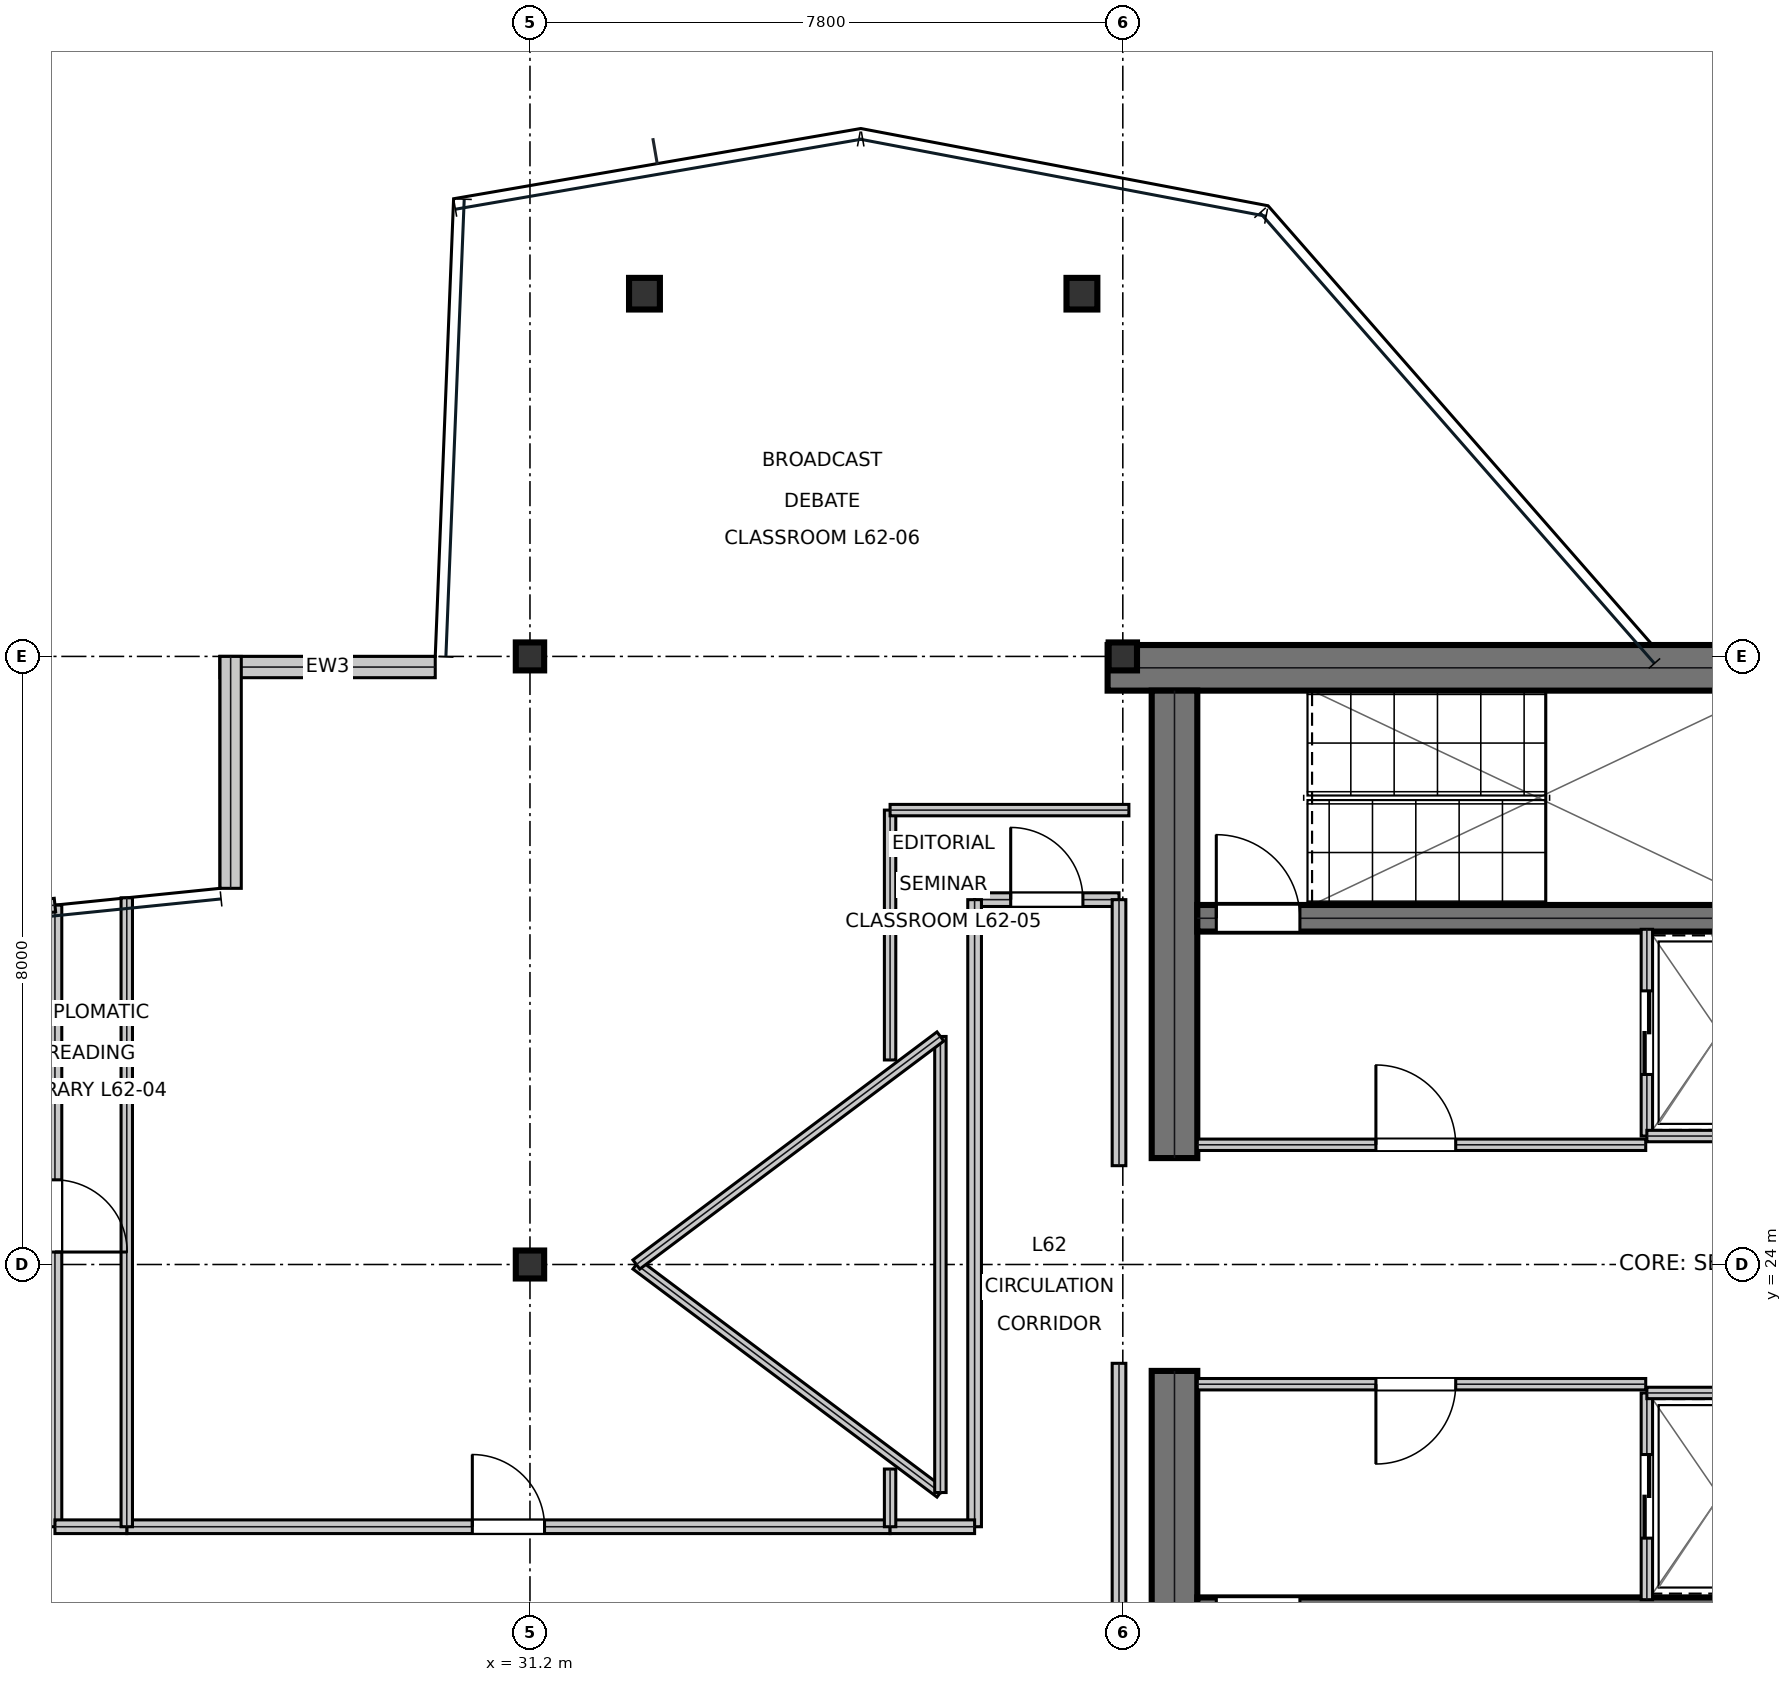
"""IFC4 building model, lengths in metres.
Left out: names, types, materials, properties, quantities, classifications, styles, units other than length and angle.
Written with IfcOpenShell. Run it as: python <this file> out.ifc"""

import sys

from ifc_helpers import new_model, si_unit, direction, frame, frame_2d, origin, origin_2d, place, context, subcontext, project, spatial, rectangle, i_section, extrude, element, fill, save


model = new_model("IFC4")
c1 = context("Model", 3, precision=1e-05, world=origin(), true_north=direction((0.0, 1.0)))
c2 = subcontext(c1, "Body", "Model", "MODEL_VIEW")
j1 = project(units=[si_unit("LENGTHUNIT", "METRE"), si_unit("PLANEANGLEUNIT", "RADIAN")], contexts=[c1])
p1 = place(None, origin())
s1 = spatial("IfcSite", under=j1, at=p1, CompositionType="ELEMENT")
p2 = place(p1, origin())
s2 = spatial("IfcBuilding", under=s1, at=p2, CompositionType="ELEMENT")
p3 = place(p2, frame((0.0, 0.0, 266.85)))
s3 = spatial("IfcBuildingStorey", under=s2, at=p3, CompositionType="ELEMENT", Elevation=266.85)
p4 = place(p3, frame((38.8, 31.85, 0.0), z_axis=(0.0, 0.0, 1.0), x_axis=(1.0, 0.0, 0.0)))
e1 = element("IfcWall", 1, at=p4, inside=s3, PredefinedType="SHEAR", context=c2, shape_type="SweptSolid", body=[
    extrude(rectangle(XDim=16.0, YDim=0.6, at=frame_2d((8.0, 0.0))), origin(), (0.0, 0.0, 1.0), 3.81),
])
for number, where, z_axis, x_axis in (
    (2, (39.68, 16.45, 0.0), (0.0, 0.0, 1.0), (0.0, 1.0, 0.0)),
    (3, (39.68, 25.4, 0.0), (0.0, 0.0, 1.0), (0.0, 1.0, 0.0)),
):
    element("IfcWall", number, at=place(p3, frame(where, z_axis=z_axis, x_axis=x_axis)), inside=s3, PredefinedType="SHEAR", context=c2, shape_type="SweptSolid", body=[
        extrude(rectangle(XDim=6.15, YDim=0.6, at=frame_2d((3.075, 0.0))), origin(), (0.0, 0.0, 1.0), 3.81),
    ])
p5 = place(p3, frame((39.98, 28.555, 0.0), z_axis=(0.0, 0.0, 1.0), x_axis=(1.0, 0.0, 0.0)))
e4 = element("IfcWall", 4, at=p5, inside=s3, PredefinedType="SHEAR", context=c2, shape_type="SweptSolid", body=[
    extrude(rectangle(XDim=7.71, YDim=0.35, at=frame_2d((3.855, 0.0))), origin(), (0.0, 0.0, 1.0), 3.81),
])
p6 = place(p5, frame((0.25, 0.0, 0.0)))
e5 = element("IfcOpeningElement", 5, at=p6, cuts=e4, PredefinedType="OPENING", context=c2, shape_type="SweptSolid", body=[
    extrude(rectangle(XDim=1.1, YDim=2.15, at=frame_2d((0.55, 1.075))), frame((0.0, 0.185, 0.0), z_axis=(0.0, -1.0, 0.0), x_axis=(1.0, 0.0, 0.0)), (0.0, 0.0, 1.0), 0.37),
])
p7 = place(p3, frame((39.98, 19.445, 0.0), z_axis=(0.0, 0.0, 1.0), x_axis=(1.0, 0.0, 0.0)))
e6 = element("IfcWall", 6, at=p7, inside=s3, PredefinedType="SHEAR", context=c2, shape_type="SweptSolid", body=[
    extrude(rectangle(XDim=7.71, YDim=0.35, at=frame_2d((3.855, 0.0))), origin(), (0.0, 0.0, 1.0), 3.81),
])
p8 = place(p7, frame((0.25, 0.0, 0.0)))
e7 = element("IfcOpeningElement", 7, at=p8, cuts=e6, PredefinedType="OPENING", context=c2, shape_type="SweptSolid", body=[
    extrude(rectangle(XDim=1.1, YDim=2.15, at=frame_2d((0.55, 1.075))), frame((0.0, 0.185, 0.0), z_axis=(0.0, -1.0, 0.0), x_axis=(1.0, 0.0, 0.0)), (0.0, 0.0, 1.0), 0.37),
])
for number, where, z_axis, x_axis in (
    (8, (31.2, 24.0, 0.0), (0.0, 0.0, 1.0), (1.0, 0.0, 0.0)),
    (9, (31.2, 32.0, 0.0), (0.0, 0.0, 1.0), (1.0, 0.0, 0.0)),
    (10, (39.0, 32.0, 0.0), (0.0, 0.0, 1.0), (1.0, 0.0, 0.0)),
):
    element("IfcColumn", number, at=place(p3, frame(where, z_axis=z_axis, x_axis=x_axis)), inside=s3, PredefinedType="COLUMN", context=c2, shape_type="SweptSolid", body=[
        extrude(i_section(OverallWidth=0.373, OverallDepth=0.368, WebThickness=0.015, FlangeThickness=0.024, at=origin_2d()), origin(), (0.0, 0.0, 1.0), 4.044),
    ])
for number, where, z_axis, x_axis in (
    (11, (32.706, 36.772, 0.016), (0.0, 0.0, 1.0), (1.0, 0.0, 0.0)),
    (12, (38.462, 36.772, 0.016), (0.0, 0.0, 1.0), (1.0, 0.0, 0.0)),
):
    element("IfcColumn", number, at=place(p3, frame(where, z_axis=z_axis, x_axis=x_axis)), inside=s3, PredefinedType="COLUMN", context=c2, shape_type="SweptSolid", body=[
        extrude(i_section(OverallWidth=0.406, OverallDepth=0.416, WebThickness=0.03, FlangeThickness=0.048, at=origin_2d()), origin(), (0.0, 0.0, 1.0), 4.018),
    ])
p9 = place(p3, frame((29.954, 31.86, 0.0), z_axis=(0.0, 0.0, 1.0), x_axis=(-1.0, 0.0, 0.0)))
e13 = element("IfcWall", 13, at=p9, inside=s3, PredefinedType="STANDARD", context=c2, shape_type="SweptSolid", body=[
    extrude(rectangle(XDim=2.832, YDim=0.28, at=frame_2d((1.416, 0.0))), origin(), (0.0, 0.0, 1.0), 3.81),
])
p10 = place(p3, frame((27.262, 32.0, 0.0), z_axis=(0.0, 0.0, 1.0), x_axis=(0.0, -1.0, 0.0)))
e14 = element("IfcWall", 14, at=p10, inside=s3, PredefinedType="STANDARD", context=c2, shape_type="SweptSolid", body=[
    extrude(rectangle(XDim=3.051, YDim=0.28, at=frame_2d((1.526, 0.0))), origin(), (0.0, 0.0, 1.0), 3.339),
])
p11 = place(p3, frame((39.98, 25.575, 0.0), z_axis=(0.0, 0.0, 1.0), x_axis=(1.0, 0.0, 0.0)))
e15 = element("IfcWall", 15, at=p11, inside=s3, PredefinedType="PARTITIONING", context=c2, shape_type="SweptSolid", body=[
    extrude(rectangle(XDim=5.9, YDim=0.15, at=frame_2d((2.95, 0.0))), origin(), (0.0, 0.0, 1.0), 3.81),
])
p12 = place(p11, frame((2.35, 0.0, 0.0)))
e16 = element("IfcOpeningElement", 16, at=p12, cuts=e15, PredefinedType="OPENING", context=c2, shape_type="SweptSolid", body=[
    extrude(rectangle(XDim=1.05, YDim=2.15, at=frame_2d((0.525, 1.075))), frame((0.0, 0.085, 0.0), z_axis=(0.0, -1.0, 0.0), x_axis=(1.0, 0.0, 0.0)), (0.0, 0.0, 1.0), 0.17),
])
p13 = place(p3, frame((39.98, 22.425, 0.0), z_axis=(0.0, 0.0, 1.0), x_axis=(1.0, 0.0, 0.0)))
e17 = element("IfcWall", 17, at=p13, inside=s3, PredefinedType="PARTITIONING", context=c2, shape_type="SweptSolid", body=[
    extrude(rectangle(XDim=5.9, YDim=0.15, at=frame_2d((2.95, 0.0))), origin(), (0.0, 0.0, 1.0), 3.81),
])
p14 = place(p13, frame((2.35, 0.0, 0.0)))
e18 = element("IfcOpeningElement", 18, at=p14, cuts=e17, PredefinedType="OPENING", context=c2, shape_type="SweptSolid", body=[
    extrude(rectangle(XDim=1.05, YDim=2.15, at=frame_2d((0.525, 1.075))), frame((0.0, 0.085, 0.0), z_axis=(0.0, -1.0, 0.0), x_axis=(1.0, 0.0, 0.0)), (0.0, 0.0, 1.0), 0.17),
])
p15 = place(p3, frame((45.895, 25.69, 0.0), z_axis=(0.0, 0.0, 1.0), x_axis=(0.0, 1.0, 0.0)))
e19 = element("IfcWall", 19, at=p15, inside=s3, PredefinedType="PARTITIONING", context=c2, shape_type="SweptSolid", body=[
    extrude(rectangle(XDim=2.72, YDim=0.15, at=frame_2d((1.36, 0.0))), origin(), (0.0, 0.0, 1.0), 3.81),
])
p16 = place(p15, frame((0.81, 0.0, 0.0)))
e20 = element("IfcOpeningElement", 20, at=p16, cuts=e19, PredefinedType="OPENING", context=c2, shape_type="SweptSolid", body=[
    extrude(rectangle(XDim=1.1, YDim=2.15, at=frame_2d((0.55, 1.075))), frame((0.0, 0.085, 0.0), z_axis=(0.0, -1.0, 0.0), x_axis=(1.0, 0.0, 0.0)), (0.0, 0.0, 1.0), 0.17),
])
p17 = place(p3, frame((45.895, 25.69, 0.0), z_axis=(0.0, 0.0, 1.0), x_axis=(1.0, 0.0, 0.0)))
e21 = element("IfcWall", 21, at=p17, inside=s3, PredefinedType="PARTITIONING", context=c2, shape_type="SweptSolid", body=[
    extrude(rectangle(XDim=1.915, YDim=0.15, at=frame_2d((0.958, 0.0))), origin(), (0.0, 0.0, 1.0), 3.81),
])
p18 = place(p3, frame((45.895, 19.59, 0.0), z_axis=(0.0, 0.0, 1.0), x_axis=(0.0, 1.0, 0.0)))
e22 = element("IfcWall", 22, at=p18, inside=s3, PredefinedType="PARTITIONING", context=c2, shape_type="SweptSolid", body=[
    extrude(rectangle(XDim=2.72, YDim=0.15, at=frame_2d((1.36, 0.0))), origin(), (0.0, 0.0, 1.0), 3.81),
])
p19 = place(p18, frame((0.81, 0.0, 0.0)))
e23 = element("IfcOpeningElement", 23, at=p19, cuts=e22, PredefinedType="OPENING", context=c2, shape_type="SweptSolid", body=[
    extrude(rectangle(XDim=1.1, YDim=2.15, at=frame_2d((0.55, 1.075))), frame((0.0, 0.085, 0.0), z_axis=(0.0, -1.0, 0.0), x_axis=(1.0, 0.0, 0.0)), (0.0, 0.0, 1.0), 0.17),
])
p20 = place(p3, frame((45.895, 22.31, 0.0), z_axis=(0.0, 0.0, 1.0), x_axis=(1.0, 0.0, 0.0)))
e24 = element("IfcWall", 24, at=p20, inside=s3, PredefinedType="PARTITIONING", context=c2, shape_type="SweptSolid", body=[
    extrude(rectangle(XDim=1.915, YDim=0.15, at=frame_2d((0.958, 0.0))), origin(), (0.0, 0.0, 1.0), 3.81),
])
p21 = place(p3, frame((24.95, 20.55, 0.0), z_axis=(0.0, 0.0, 1.0), x_axis=(0.0, 1.0, 0.0)))
e25 = element("IfcWall", 25, at=p21, inside=s3, PredefinedType="SOLIDWALL", context=c2, shape_type="SweptSolid", body=[
    extrude(rectangle(XDim=8.178, YDim=0.18, at=frame_2d((4.089, 0.0))), origin(), (0.0, 0.0, 1.0), 3.27),
])
p22 = place(p21, frame((3.614, 0.0, 0.0)))
e26 = element("IfcOpeningElement", 26, at=p22, cuts=e25, PredefinedType="OPENING", context=c2, shape_type="SweptSolid", body=[
    extrude(rectangle(XDim=0.95, YDim=2.15, at=frame_2d((0.475, 1.075))), frame((0.0, 0.1, 0.0), z_axis=(0.0, -1.0, 0.0), x_axis=(1.0, 0.0, 0.0)), (0.0, 0.0, 1.0), 0.2),
])
p23 = place(p3, frame((37.05, 28.8, 0.0), z_axis=(0.0, 0.0, 1.0), x_axis=(1.0, 0.0, 0.0)))
e27 = element("IfcWall", 27, at=p23, inside=s3, PredefinedType="SOLIDWALL", context=c2, shape_type="SweptSolid", body=[
    extrude(rectangle(XDim=1.9, YDim=0.18, at=frame_2d((0.95, 0.0))), origin(), (0.0, 0.0, 1.0), 3.81),
])
p24 = place(p23, frame((0.475, 0.0, 0.0)))
e28 = element("IfcOpeningElement", 28, at=p24, cuts=e27, PredefinedType="OPENING", context=c2, shape_type="SweptSolid", body=[
    extrude(rectangle(XDim=0.95, YDim=2.15, at=frame_2d((0.475, 1.075))), frame((0.0, 0.1, 0.0), z_axis=(0.0, -1.0, 0.0), x_axis=(1.0, 0.0, 0.0)), (0.0, 0.0, 1.0), 0.2),
])
p25 = place(p3, frame((25.895, 20.55, 0.0), z_axis=(0.0, 0.0, 1.0), x_axis=(1.0, 0.0, 0.0)))
e29 = element("IfcWall", 29, at=p25, inside=s3, PredefinedType="SOLIDWALL", context=c2, shape_type="SweptSolid", body=[
    extrude(rectangle(XDim=10.043, YDim=0.18, at=frame_2d((5.021, 0.0))), origin(), (0.0, 0.0, 1.0), 3.27),
])
p26 = place(p25, frame((4.546, 0.0, 0.0)))
e30 = element("IfcOpeningElement", 30, at=p26, cuts=e29, PredefinedType="OPENING", context=c2, shape_type="SweptSolid", body=[
    extrude(rectangle(XDim=0.95, YDim=2.15, at=frame_2d((0.475, 1.075))), frame((0.0, 0.1, 0.0), z_axis=(0.0, -1.0, 0.0), x_axis=(1.0, 0.0, 0.0)), (0.0, 0.0, 1.0), 0.2),
])
p27 = place(p3, frame((38.95, 18.8, 0.0), z_axis=(0.0, 0.0, 1.0), x_axis=(0.0, 1.0, 0.0)))
e31 = element("IfcWall", 31, at=p27, inside=s3, PredefinedType="SOLIDWALL", context=c2, shape_type="SweptSolid", body=[
    extrude(rectangle(XDim=3.9, YDim=0.18, at=frame_2d((1.95, 0.0))), origin(), (0.0, 0.0, 1.0), 3.54),
])
p28 = place(p3, frame((23.872, 28.618, 0.0), z_axis=(0.0, 0.0, 1.0), x_axis=(0.994866145346, 0.101199569384, 0.0)))
e32 = element("IfcWall", 32, at=p28, inside=s3, PredefinedType="SOLIDWALL", context=c2, shape_type="SweptSolid", body=[
    extrude(rectangle(XDim=1.083, YDim=0.18, at=frame_2d((0.542, 0.0))), origin(), (0.0, 0.0, 1.0), 3.81),
])
p29 = place(p3, frame((24.95, 20.55, 0.0), z_axis=(0.0, 0.0, 1.0), x_axis=(1.0, 0.0, 0.0)))
e33 = element("IfcWall", 33, at=p29, inside=s3, PredefinedType="SOLIDWALL", context=c2, shape_type="SweptSolid", body=[
    extrude(rectangle(XDim=0.945, YDim=0.18, at=frame_2d((0.473, 0.0))), origin(), (0.0, 0.0, 1.0), 3.81),
])
p30 = place(p3, frame((37.05, 20.55, 0.0), z_axis=(0.0, 0.0, 1.0), x_axis=(0.0, 1.0, 0.0)))
e34 = element("IfcWall", 34, at=p30, inside=s3, PredefinedType="SOLIDWALL", context=c2, shape_type="SweptSolid", body=[
    extrude(rectangle(XDim=8.25, YDim=0.18, at=frame_2d((4.125, 0.0))), origin(), (0.0, 0.0, 1.0), 3.54),
])
p31 = place(p3, frame((38.95, 25.3, 0.0), z_axis=(0.0, 0.0, 1.0), x_axis=(0.0, 1.0, 0.0)))
e35 = element("IfcWall", 35, at=p31, inside=s3, PredefinedType="SOLIDWALL", context=c2, shape_type="SweptSolid", body=[
    extrude(rectangle(XDim=3.5, YDim=0.18, at=frame_2d((1.75, 0.0))), origin(), (0.0, 0.0, 1.0), 3.54),
])
p32 = place(p3, frame((35.938, 20.55, 0.0), z_axis=(0.0, 0.0, 1.0), x_axis=(1.0, 0.0, 0.0)))
e36 = element("IfcWall", 36, at=p32, inside=s3, PredefinedType="SOLIDWALL", context=c2, shape_type="SweptSolid", body=[
    extrude(rectangle(XDim=1.112, YDim=0.18, at=frame_2d((0.556, 0.0))), origin(), (0.0, 0.0, 1.0), 3.54),
])
p33 = place(p3, frame((25.895, 20.55, 0.0), z_axis=(0.0, 0.0, 1.0), x_axis=(0.0, 1.0, 0.0)))
e37 = element("IfcWall", 37, at=p33, inside=s3, PredefinedType="MOVABLE", context=c2, shape_type="SweptSolid", body=[
    extrude(rectangle(XDim=8.274, YDim=0.15, at=frame_2d((4.137, 0.0))), origin(), (0.0, 0.0, 1.0), 3.27),
])
p34 = place(p3, frame((35.938, 26.691, 0.0), z_axis=(0.0, 0.0, 1.0), x_axis=(0.0, 1.0, 0.0)))
e38 = element("IfcWall", 38, at=p34, inside=s3, PredefinedType="MOVABLE", context=c2, shape_type="SweptSolid", body=[
    extrude(rectangle(XDim=3.287, YDim=0.15, at=frame_2d((1.644, 0.0))), origin(), (0.0, 0.0, 1.0), 3.54),
])
p35 = place(p3, frame((35.938, 29.978, 0.0), z_axis=(0.0, 0.0, 1.0), x_axis=(1.0, 0.0, 0.0)))
e39 = element("IfcWall", 39, at=p35, inside=s3, PredefinedType="MOVABLE", context=c2, shape_type="SweptSolid", body=[
    extrude(rectangle(XDim=3.142, YDim=0.15, at=frame_2d((1.571, 0.0))), origin(), (0.0, 0.0, 1.0), 3.54),
])
p36 = place(p3, frame((35.938, 20.55, 0.0), z_axis=(0.0, 0.0, 1.0), x_axis=(0.0, 1.0, 0.0)))
e40 = element("IfcWall", 40, at=p36, inside=s3, PredefinedType="MOVABLE", context=c2, shape_type="SweptSolid", body=[
    extrude(rectangle(XDim=0.759, YDim=0.15, at=frame_2d((0.379, 0.0))), origin(), (0.0, 0.0, 1.0), 3.81),
])
p37 = place(p3, frame((32.6, 24.0, 0.0), z_axis=(0.0, 0.0, 1.0), x_axis=(0.8, -0.6, 0.0)))
e41 = element("IfcWall", 41, at=p37, inside=s3, PredefinedType="MOVABLE", context=c2, shape_type="SweptSolid", body=[
    extrude(rectangle(XDim=5.0, YDim=0.15, at=frame_2d((2.5, 0.0))), origin(), (0.0, 0.0, 1.0), 3.81),
])
p38 = place(p3, frame((36.6, 21.0, 0.0), z_axis=(0.0, 0.0, 1.0), x_axis=(0.0, 1.0, 0.0)))
e42 = element("IfcWall", 42, at=p38, inside=s3, PredefinedType="MOVABLE", context=c2, shape_type="SweptSolid", body=[
    extrude(rectangle(XDim=6.0, YDim=0.15, at=frame_2d((3.0, 0.0))), origin(), (0.0, 0.0, 1.0), 3.81),
])
p39 = place(p3, frame((36.6, 27.0, 0.0), z_axis=(0.0, 0.0, 1.0), x_axis=(-0.8, -0.6, 0.0)))
e43 = element("IfcWall", 43, at=p39, inside=s3, PredefinedType="MOVABLE", context=c2, shape_type="SweptSolid", body=[
    extrude(rectangle(XDim=5.0, YDim=0.15, at=frame_2d((2.5, 0.0))), origin(), (0.0, 0.0, 1.0), 3.81),
])
p40 = place(p12, origin())
e44 = element("IfcDoor", 44, at=p40, inside=s3, OperationType="SINGLE_SWING_LEFT", PredefinedType="DOOR", context=c2, shape_type="SweptSolid", body=[
    extrude(rectangle(XDim=1.05, YDim=2.15, at=frame_2d((0.525, 1.075))), frame((0.0, 0.025, 0.0), z_axis=(0.0, -1.0, 0.0), x_axis=(1.0, 0.0, 0.0)), (0.0, 0.0, 1.0), 0.05),
])
fill(e16, e44)
p41 = place(p14, frame((1.05, 0.0, 0.0), z_axis=(0.0, 0.0, 1.0), x_axis=(-1.0, 0.0, 0.0)))
e45 = element("IfcDoor", 45, at=p41, inside=s3, OperationType="SINGLE_SWING_RIGHT", PredefinedType="DOOR", context=c2, shape_type="SweptSolid", body=[
    extrude(rectangle(XDim=1.05, YDim=2.15, at=frame_2d((0.525, 1.075))), frame((0.0, 0.025, 0.0), z_axis=(0.0, -1.0, 0.0), x_axis=(1.0, 0.0, 0.0)), (0.0, 0.0, 1.0), 0.05),
])
fill(e18, e45)
p42 = place(p16, frame((1.1, 0.0, 0.0), z_axis=(0.0, 0.0, 1.0), x_axis=(-1.0, 0.0, 0.0)))
e46 = element("IfcDoor", 46, at=p42, inside=s3, OperationType="DOUBLE_DOOR_SLIDING", PredefinedType="DOOR", context=c2, shape_type="SweptSolid", body=[
    extrude(rectangle(XDim=1.1, YDim=2.15, at=frame_2d((0.55, 1.075))), frame((0.0, 0.025, 0.0), z_axis=(0.0, -1.0, 0.0), x_axis=(1.0, 0.0, 0.0)), (0.0, 0.0, 1.0), 0.05),
])
fill(e20, e46)
p43 = place(p19, frame((1.1, 0.0, 0.0), z_axis=(0.0, 0.0, 1.0), x_axis=(-1.0, 0.0, 0.0)))
e47 = element("IfcDoor", 47, at=p43, inside=s3, OperationType="DOUBLE_DOOR_SLIDING", PredefinedType="DOOR", context=c2, shape_type="SweptSolid", body=[
    extrude(rectangle(XDim=1.1, YDim=2.15, at=frame_2d((0.55, 1.075))), frame((0.0, 0.025, 0.0), z_axis=(0.0, -1.0, 0.0), x_axis=(1.0, 0.0, 0.0)), (0.0, 0.0, 1.0), 0.05),
])
fill(e23, e47)
p44 = place(p22, frame((0.95, 0.0, 0.0), z_axis=(0.0, 0.0, 1.0), x_axis=(-1.0, 0.0, 0.0)))
e48 = element("IfcDoor", 48, at=p44, inside=s3, OperationType="SINGLE_SWING_RIGHT", PredefinedType="DOOR", context=c2, shape_type="SweptSolid", body=[
    extrude(rectangle(XDim=0.95, YDim=2.15, at=frame_2d((0.475, 1.075))), frame((0.0, 0.025, 0.0), z_axis=(0.0, -1.0, 0.0), x_axis=(1.0, 0.0, 0.0)), (0.0, 0.0, 1.0), 0.05),
])
fill(e26, e48)
p45 = place(p24, origin())
e49 = element("IfcDoor", 49, at=p45, inside=s3, OperationType="SINGLE_SWING_LEFT", PredefinedType="DOOR", context=c2, shape_type="SweptSolid", body=[
    extrude(rectangle(XDim=0.95, YDim=2.15, at=frame_2d((0.475, 1.075))), frame((0.0, 0.025, 0.0), z_axis=(0.0, -1.0, 0.0), x_axis=(1.0, 0.0, 0.0)), (0.0, 0.0, 1.0), 0.05),
])
fill(e28, e49)
p46 = place(p26, origin())
e50 = element("IfcDoor", 50, at=p46, inside=s3, OperationType="SINGLE_SWING_LEFT", PredefinedType="DOOR", context=c2, shape_type="SweptSolid", body=[
    extrude(rectangle(XDim=0.95, YDim=2.15, at=frame_2d((0.475, 1.075))), frame((0.0, 0.025, 0.0), z_axis=(0.0, -1.0, 0.0), x_axis=(1.0, 0.0, 0.0)), (0.0, 0.0, 1.0), 0.05),
])
fill(e30, e50)
p47 = place(p6, origin())
e51 = element("IfcDoor", 51, at=p47, inside=s3, OperationType="SINGLE_SWING_LEFT", PredefinedType="DOOR", context=c2, shape_type="SweptSolid", body=[
    extrude(rectangle(XDim=1.1, YDim=2.15, at=frame_2d((0.55, 1.075))), frame((0.0, 0.025, 0.0), z_axis=(0.0, -1.0, 0.0), x_axis=(1.0, 0.0, 0.0)), (0.0, 0.0, 1.0), 0.05),
])
fill(e5, e51)
save(model, sys.argv[1])
